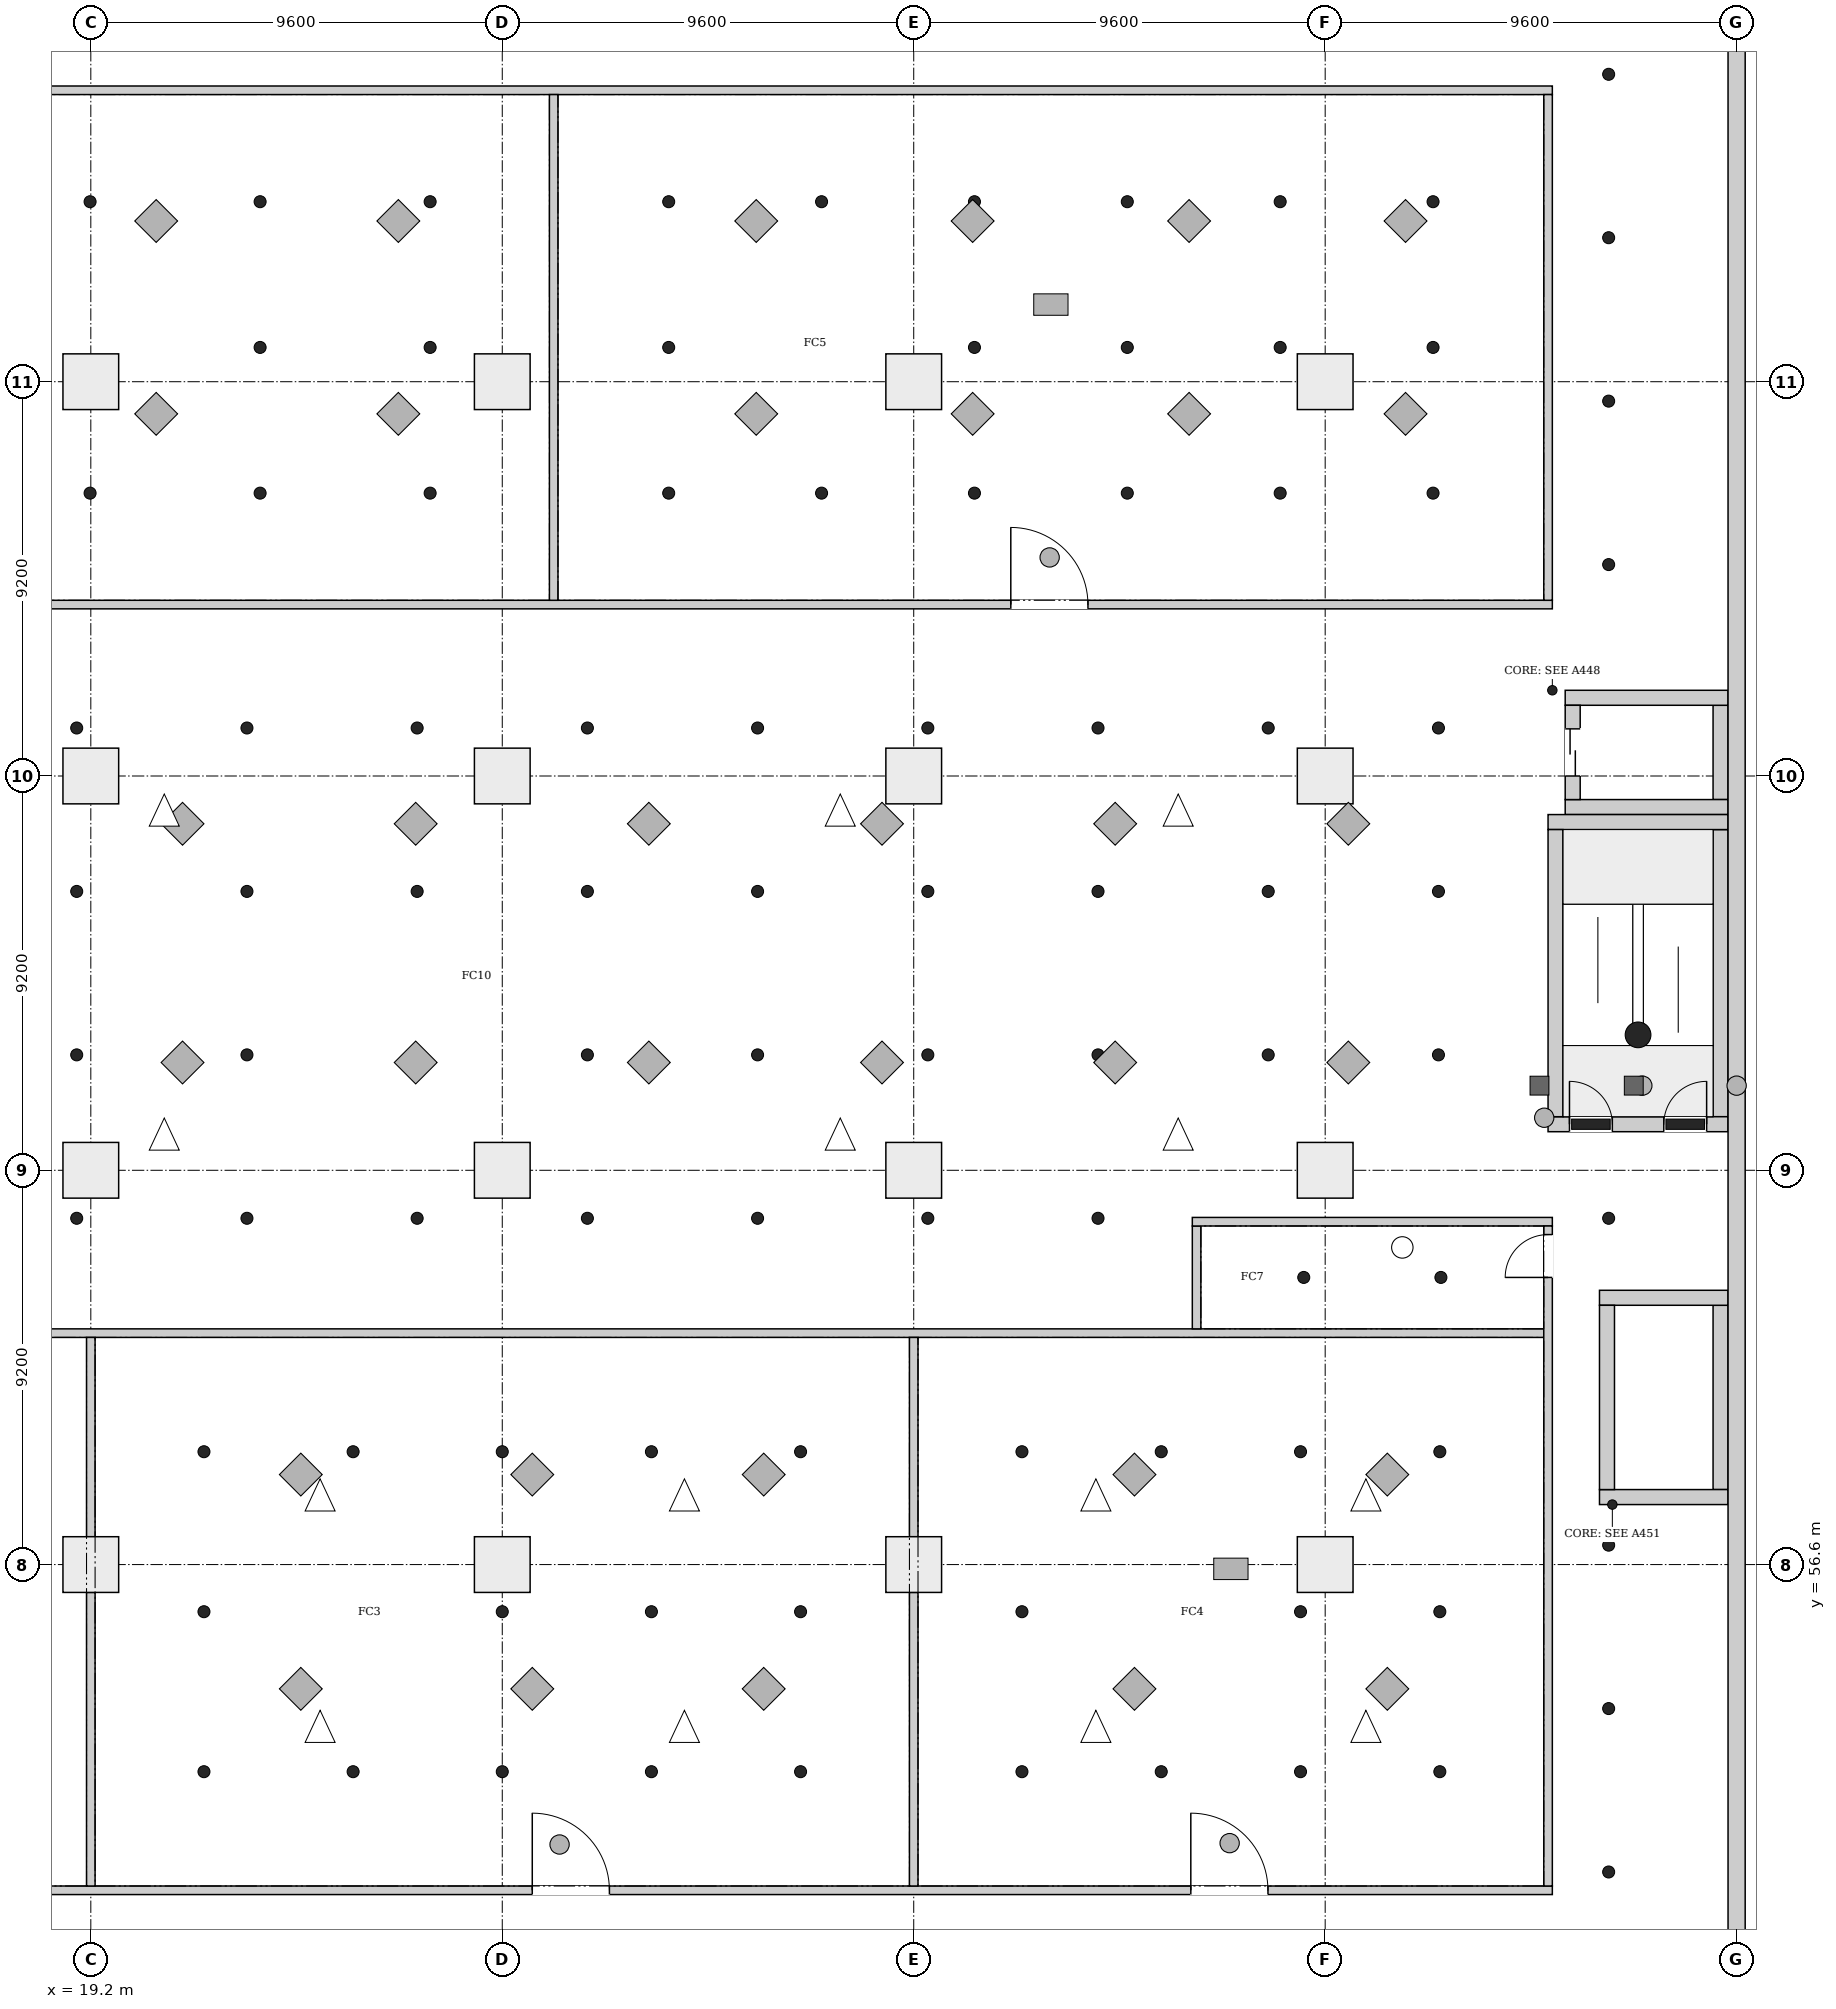
"""IFC4 building model, lengths in metres.
Left out: names, types, materials, properties, quantities, classifications, styles, units other than length and angle.
Written with IfcOpenShell. Run it as: python <this file> out.ifc"""

import sys

from ifc_helpers import new_model, si_unit, direction, frame, frame_2d, origin, origin_2d, place, context, subcontext, project, spatial, rectangle, extrude, element, fill, save


model = new_model("IFC4")
c1 = context("Model", 3, precision=1e-05, world=origin(), true_north=direction((0.0, 1.0)))
c2 = subcontext(c1, "Body", "Model", "MODEL_VIEW")
j1 = project(units=[si_unit("LENGTHUNIT", "METRE"), si_unit("PLANEANGLEUNIT", "RADIAN")], contexts=[c1])
p1 = place(None, origin())
s1 = spatial("IfcSite", under=j1, at=p1, CompositionType="ELEMENT")
p2 = place(p1, origin())
s2 = spatial("IfcBuilding", under=s1, at=p2, CompositionType="ELEMENT")
p3 = place(p2, frame((0.0, 0.0, 6.5)))
s3 = spatial("IfcBuildingStorey", under=s2, at=p3, CompositionType="ELEMENT", Elevation=6.5)
p4 = place(p3, frame((57.6, 46.72, 0.0), z_axis=(0.0, 0.0, 1.0), x_axis=(0.0, 1.0, 0.0)))
e1 = element("IfcWall", 1, at=p4, inside=s3, PredefinedType="SHEAR", context=c2, shape_type="SweptSolid", body=[
    extrude(rectangle(XDim=47.36, YDim=0.4, at=frame_2d((23.68, 0.0))), origin(), (0.0, 0.0, 1.0), 7.7),
])
p5 = place(p3, frame((53.2, 66.875, 0.0), z_axis=(0.0, 0.0, 1.0), x_axis=(1.0, 0.0, 0.0)))
e2 = element("IfcWall", 2, at=p5, inside=s3, PredefinedType="SHEAR", context=c2, shape_type="SweptSolid", body=[
    extrude(rectangle(XDim=4.2, YDim=0.35, at=frame_2d((2.1, 0.0))), origin(), (0.0, 0.0, 1.0), 7.7),
])
p6 = place(p5, frame((0.5, 0.0, 0.0)))
e3 = element("IfcOpeningElement", 3, at=p6, cuts=e2, PredefinedType="OPENING", context=c2, shape_type="SweptSolid", body=[
    extrude(rectangle(XDim=1.0, YDim=2.1, at=frame_2d((0.5, 1.05))), frame((0.0, 0.185, 0.0), z_axis=(0.0, -1.0, 0.0), x_axis=(1.0, 0.0, 0.0)), (0.0, 0.0, 1.0), 0.37),
])
p7 = place(p5, frame((2.7, 0.0, 0.0)))
e4 = element("IfcOpeningElement", 4, at=p7, cuts=e2, PredefinedType="OPENING", context=c2, shape_type="SweptSolid", body=[
    extrude(rectangle(XDim=1.0, YDim=2.1, at=frame_2d((0.5, 1.05))), frame((0.0, 0.185, 0.0), z_axis=(0.0, -1.0, 0.0), x_axis=(1.0, 0.0, 0.0)), (0.0, 0.0, 1.0), 0.37),
])
p8 = place(p3, frame((53.2, 73.925, 0.0), z_axis=(0.0, 0.0, 1.0), x_axis=(1.0, 0.0, 0.0)))
e5 = element("IfcWall", 5, at=p8, inside=s3, PredefinedType="SHEAR", context=c2, shape_type="SweptSolid", body=[
    extrude(rectangle(XDim=4.2, YDim=0.35, at=frame_2d((2.1, 0.0))), origin(), (0.0, 0.0, 1.0), 7.7),
])
for number, where, z_axis, x_axis in (
    (6, (53.375, 67.05, 0.0), (0.0, 0.0, 1.0), (0.0, 1.0, 0.0)),
    (7, (57.225, 67.05, 0.0), (0.0, 0.0, 1.0), (0.0, 1.0, 0.0)),
):
    element("IfcWall", number, at=place(p3, frame(where, z_axis=z_axis, x_axis=x_axis)), inside=s3, PredefinedType="SHEAR", context=c2, shape_type="SweptSolid", body=[
        extrude(rectangle(XDim=6.7, YDim=0.35, at=frame_2d((3.35, 0.0))), origin(), (0.0, 0.0, 1.0), 7.7),
    ])
for number, where, z_axis, x_axis in (
    (8, (53.6, 74.275, 0.0), (0.0, 0.0, 1.0), (1.0, 0.0, 0.0)),
    (9, (53.6, 76.825, 0.0), (0.0, 0.0, 1.0), (1.0, 0.0, 0.0)),
):
    element("IfcWall", number, at=place(p3, frame(where, z_axis=z_axis, x_axis=x_axis)), inside=s3, PredefinedType="SHEAR", context=c2, shape_type="SweptSolid", body=[
        extrude(rectangle(XDim=3.8, YDim=0.35, at=frame_2d((1.9, 0.0))), origin(), (0.0, 0.0, 1.0), 7.7),
    ])
p9 = place(p3, frame((53.775, 74.45, 0.0), z_axis=(0.0, 0.0, 1.0), x_axis=(0.0, 1.0, 0.0)))
e10 = element("IfcWall", 10, at=p9, inside=s3, PredefinedType="SHEAR", context=c2, shape_type="SweptSolid", body=[
    extrude(rectangle(XDim=2.2, YDim=0.35, at=frame_2d((1.1, 0.0))), origin(), (0.0, 0.0, 1.0), 7.7),
])
p10 = place(p9, frame((0.55, 0.0, 0.0)))
e11 = element("IfcOpeningElement", 11, at=p10, cuts=e10, PredefinedType="OPENING", context=c2, shape_type="SweptSolid", body=[
    extrude(rectangle(XDim=1.1, YDim=2.1, at=frame_2d((0.55, 1.05))), frame((0.0, 0.185, 0.0), z_axis=(0.0, -1.0, 0.0), x_axis=(1.0, 0.0, 0.0)), (0.0, 0.0, 1.0), 0.37),
])
p11 = place(p3, frame((57.225, 74.45, 0.0), z_axis=(0.0, 0.0, 1.0), x_axis=(0.0, 1.0, 0.0)))
e12 = element("IfcWall", 12, at=p11, inside=s3, PredefinedType="SHEAR", context=c2, shape_type="SweptSolid", body=[
    extrude(rectangle(XDim=2.2, YDim=0.35, at=frame_2d((1.1, 0.0))), origin(), (0.0, 0.0, 1.0), 7.7),
])
for number, where, z_axis, x_axis in (
    (13, (54.4, 58.175, 0.0), (0.0, 0.0, 1.0), (1.0, 0.0, 0.0)),
    (14, (54.4, 62.825, 0.0), (0.0, 0.0, 1.0), (1.0, 0.0, 0.0)),
):
    element("IfcWall", number, at=place(p3, frame(where, z_axis=z_axis, x_axis=x_axis)), inside=s3, PredefinedType="SHEAR", context=c2, shape_type="SweptSolid", body=[
        extrude(rectangle(XDim=3.0, YDim=0.35, at=frame_2d((1.5, 0.0))), origin(), (0.0, 0.0, 1.0), 7.7),
    ])
for number, where, z_axis, x_axis in (
    (15, (54.575, 58.35, 0.0), (0.0, 0.0, 1.0), (0.0, 1.0, 0.0)),
    (16, (57.225, 58.35, 0.0), (0.0, 0.0, 1.0), (0.0, 1.0, 0.0)),
):
    element("IfcWall", number, at=place(p3, frame(where, z_axis=z_axis, x_axis=x_axis)), inside=s3, PredefinedType="SHEAR", context=c2, shape_type="SweptSolid", body=[
        extrude(rectangle(XDim=4.3, YDim=0.35, at=frame_2d((2.15, 0.0))), origin(), (0.0, 0.0, 1.0), 7.7),
    ])
for number, where, z_axis, x_axis in (
    (17, (19.2, 56.6, 0.0), (0.0, 0.0, 1.0), (1.0, 0.0, 0.0)),
    (18, (28.8, 56.6, 0.0), (0.0, 0.0, 1.0), (1.0, 0.0, 0.0)),
    (19, (38.4, 56.6, 0.0), (0.0, 0.0, 1.0), (1.0, 0.0, 0.0)),
    (20, (48.0, 56.6, 0.0), (0.0, 0.0, 1.0), (1.0, 0.0, 0.0)),
    (21, (19.2, 65.8, 0.0), (0.0, 0.0, 1.0), (1.0, 0.0, 0.0)),
    (22, (28.8, 65.8, 0.0), (0.0, 0.0, 1.0), (1.0, 0.0, 0.0)),
    (23, (38.4, 65.8, 0.0), (0.0, 0.0, 1.0), (1.0, 0.0, 0.0)),
    (24, (48.0, 65.8, 0.0), (0.0, 0.0, 1.0), (1.0, 0.0, 0.0)),
    (25, (19.2, 75.0, 0.0), (0.0, 0.0, 1.0), (1.0, 0.0, 0.0)),
    (26, (28.8, 75.0, 0.0), (0.0, 0.0, 1.0), (1.0, 0.0, 0.0)),
    (27, (38.4, 75.0, 0.0), (0.0, 0.0, 1.0), (1.0, 0.0, 0.0)),
    (28, (48.0, 75.0, 0.0), (0.0, 0.0, 1.0), (1.0, 0.0, 0.0)),
    (29, (19.2, 84.2, 0.0), (0.0, 0.0, 1.0), (1.0, 0.0, 0.0)),
    (30, (28.8, 84.2, 0.0), (0.0, 0.0, 1.0), (1.0, 0.0, 0.0)),
    (31, (38.4, 84.2, 0.0), (0.0, 0.0, 1.0), (1.0, 0.0, 0.0)),
    (32, (48.0, 84.2, 0.0), (0.0, 0.0, 1.0), (1.0, 0.0, 0.0)),
):
    element("IfcColumn", number, at=place(p3, frame(where, z_axis=z_axis, x_axis=x_axis)), inside=s3, PredefinedType="COLUMN", context=c2, shape_type="SweptSolid", body=[
        extrude(rectangle(XDim=1.3, YDim=1.3, at=origin_2d()), origin(), (0.0, 0.0, 1.0), 7.7),
    ])
p12 = place(p3, frame((4.3, 49.0, 0.0), z_axis=(0.0, 0.0, 1.0), x_axis=(1.0, 0.0, 0.0)))
e33 = element("IfcWall", 33, at=p12, inside=s3, PredefinedType="PARTITIONING", context=c2, shape_type="SweptSolid", body=[
    extrude(rectangle(XDim=49.0, YDim=0.2, at=frame_2d((24.5, 0.0))), origin(), (0.0, 0.0, 1.0), 5.1),
])
p13 = place(p12, frame((6.635, 0.0, 0.0)))
e34 = element("IfcOpeningElement", 34, at=p13, cuts=e33, PredefinedType="OPENING", context=c2, shape_type="SweptSolid", body=[
    extrude(rectangle(XDim=1.8, YDim=2.1, at=frame_2d((0.9, 1.05))), frame((0.0, 0.11, 0.0), z_axis=(0.0, -1.0, 0.0), x_axis=(1.0, 0.0, 0.0)), (0.0, 0.0, 1.0), 0.22),
])
p14 = place(p12, frame((25.2, 0.0, 0.0)))
e35 = element("IfcOpeningElement", 35, at=p14, cuts=e33, PredefinedType="OPENING", context=c2, shape_type="SweptSolid", body=[
    extrude(rectangle(XDim=1.8, YDim=2.1, at=frame_2d((0.9, 1.05))), frame((0.0, 0.11, 0.0), z_axis=(0.0, -1.0, 0.0), x_axis=(1.0, 0.0, 0.0)), (0.0, 0.0, 1.0), 0.22),
])
p15 = place(p12, frame((40.565, 0.0, 0.0)))
e36 = element("IfcOpeningElement", 36, at=p15, cuts=e33, PredefinedType="OPENING", context=c2, shape_type="SweptSolid", body=[
    extrude(rectangle(XDim=1.8, YDim=2.1, at=frame_2d((0.9, 1.05))), frame((0.0, 0.11, 0.0), z_axis=(0.0, -1.0, 0.0), x_axis=(1.0, 0.0, 0.0)), (0.0, 0.0, 1.0), 0.22),
])
p16 = place(p3, frame((4.3, 79.0, 0.0), z_axis=(0.0, 0.0, 1.0), x_axis=(1.0, 0.0, 0.0)))
e37 = element("IfcWall", 37, at=p16, inside=s3, PredefinedType="PARTITIONING", context=c2, shape_type="SweptSolid", body=[
    extrude(rectangle(XDim=49.0, YDim=0.2, at=frame_2d((24.5, 0.0))), origin(), (0.0, 0.0, 1.0), 5.1),
])
p17 = place(p16, frame((12.035, 0.0, 0.0)))
e38 = element("IfcOpeningElement", 38, at=p17, cuts=e37, PredefinedType="OPENING", context=c2, shape_type="SweptSolid", body=[
    extrude(rectangle(XDim=1.8, YDim=2.1, at=frame_2d((0.9, 1.05))), frame((0.0, 0.11, 0.0), z_axis=(0.0, -1.0, 0.0), x_axis=(1.0, 0.0, 0.0)), (0.0, 0.0, 1.0), 0.22),
])
p18 = place(p16, frame((36.365, 0.0, 0.0)))
e39 = element("IfcOpeningElement", 39, at=p18, cuts=e37, PredefinedType="OPENING", context=c2, shape_type="SweptSolid", body=[
    extrude(rectangle(XDim=1.8, YDim=2.1, at=frame_2d((0.9, 1.05))), frame((0.0, 0.11, 0.0), z_axis=(0.0, -1.0, 0.0), x_axis=(1.0, 0.0, 0.0)), (0.0, 0.0, 1.0), 0.22),
])
p19 = place(p3, frame((4.3, 91.0, 0.0), z_axis=(0.0, 0.0, 1.0), x_axis=(1.0, 0.0, 0.0)))
e40 = element("IfcWall", 40, at=p19, inside=s3, PredefinedType="PARTITIONING", context=c2, shape_type="SweptSolid", body=[
    extrude(rectangle(XDim=49.0, YDim=0.2, at=frame_2d((24.5, 0.0))), origin(), (0.0, 0.0, 1.0), 5.1),
])
p20 = place(p3, frame((4.5, 62.0, 0.0), z_axis=(0.0, 0.0, 1.0), x_axis=(1.0, 0.0, 0.0)))
e41 = element("IfcWall", 41, at=p20, inside=s3, PredefinedType="PARTITIONING", context=c2, shape_type="SweptSolid", body=[
    extrude(rectangle(XDim=48.6, YDim=0.2, at=frame_2d((24.3, 0.0))), origin(), (0.0, 0.0, 1.0), 5.1),
])
p21 = place(p3, frame((19.2, 49.1, 0.0), z_axis=(0.0, 0.0, 1.0), x_axis=(0.0, 1.0, 0.0)))
e42 = element("IfcWall", 42, at=p21, inside=s3, PredefinedType="PARTITIONING", context=c2, shape_type="SweptSolid", body=[
    extrude(rectangle(XDim=6.85, YDim=0.2, at=frame_2d((3.425, 0.0))), origin(), (0.0, 0.0, 1.0), 4.7),
])
p22 = place(p3, frame((19.2, 57.25, 0.0), z_axis=(0.0, 0.0, 1.0), x_axis=(0.0, 1.0, 0.0)))
e43 = element("IfcWall", 43, at=p22, inside=s3, PredefinedType="PARTITIONING", context=c2, shape_type="SweptSolid", body=[
    extrude(rectangle(XDim=4.65, YDim=0.2, at=frame_2d((2.325, 0.0))), origin(), (0.0, 0.0, 1.0), 4.7),
])
p23 = place(p3, frame((30.0, 79.1, 0.0), z_axis=(0.0, 0.0, 1.0), x_axis=(0.0, 1.0, 0.0)))
e44 = element("IfcWall", 44, at=p23, inside=s3, PredefinedType="PARTITIONING", context=c2, shape_type="SweptSolid", body=[
    extrude(rectangle(XDim=11.8, YDim=0.2, at=frame_2d((5.9, 0.0))), origin(), (0.0, 0.0, 1.0), 5.1),
])
p24 = place(p3, frame((38.4, 49.1, 0.0), z_axis=(0.0, 0.0, 1.0), x_axis=(0.0, 1.0, 0.0)))
e45 = element("IfcWall", 45, at=p24, inside=s3, PredefinedType="PARTITIONING", context=c2, shape_type="SweptSolid", body=[
    extrude(rectangle(XDim=6.85, YDim=0.2, at=frame_2d((3.425, 0.0))), origin(), (0.0, 0.0, 1.0), 4.7),
])
p25 = place(p3, frame((38.4, 57.25, 0.0), z_axis=(0.0, 0.0, 1.0), x_axis=(0.0, 1.0, 0.0)))
e46 = element("IfcWall", 46, at=p25, inside=s3, PredefinedType="PARTITIONING", context=c2, shape_type="SweptSolid", body=[
    extrude(rectangle(XDim=4.65, YDim=0.2, at=frame_2d((2.325, 0.0))), origin(), (0.0, 0.0, 1.0), 4.7),
])
p26 = place(p3, frame((45.0, 62.1, 0.0), z_axis=(0.0, 0.0, 1.0), x_axis=(0.0, 1.0, 0.0)))
e47 = element("IfcWall", 47, at=p26, inside=s3, PredefinedType="PARTITIONING", context=c2, shape_type="SweptSolid", body=[
    extrude(rectangle(XDim=2.4, YDim=0.2, at=frame_2d((1.2, 0.0))), origin(), (0.0, 0.0, 1.0), 5.1),
])
p27 = place(p3, frame((44.9, 64.6, 0.0), z_axis=(0.0, 0.0, 1.0), x_axis=(1.0, 0.0, 0.0)))
e48 = element("IfcWall", 48, at=p27, inside=s3, PredefinedType="PARTITIONING", context=c2, shape_type="SweptSolid", body=[
    extrude(rectangle(XDim=8.4, YDim=0.2, at=frame_2d((4.2, 0.0))), origin(), (0.0, 0.0, 1.0), 5.1),
])
p28 = place(p3, frame((53.2, 49.1, 0.0), z_axis=(0.0, 0.0, 1.0), x_axis=(0.0, 1.0, 0.0)))
e49 = element("IfcWall", 49, at=p28, inside=s3, PredefinedType="PARTITIONING", context=c2, shape_type="SweptSolid", body=[
    extrude(rectangle(XDim=15.4, YDim=0.2, at=frame_2d((7.7, 0.0))), origin(), (0.0, 0.0, 1.0), 7.35),
])
p29 = place(p28, frame((14.2, 0.0, 0.0)))
e50 = element("IfcOpeningElement", 50, at=p29, cuts=e49, PredefinedType="OPENING", context=c2, shape_type="SweptSolid", body=[
    extrude(rectangle(XDim=1.0, YDim=2.1, at=frame_2d((0.5, 1.05))), frame((0.0, 0.11, 0.0), z_axis=(0.0, -1.0, 0.0), x_axis=(1.0, 0.0, 0.0)), (0.0, 0.0, 1.0), 0.22),
])
p30 = place(p3, frame((53.2, 79.1, 0.0), z_axis=(0.0, 0.0, 1.0), x_axis=(0.0, 1.0, 0.0)))
e51 = element("IfcWall", 51, at=p30, inside=s3, PredefinedType="PARTITIONING", context=c2, shape_type="SweptSolid", body=[
    extrude(rectangle(XDim=11.8, YDim=0.2, at=frame_2d((5.9, 0.0))), origin(), (0.0, 0.0, 1.0), 7.35),
])
p31 = place(p6, origin())
e52 = element("IfcDoor", 52, at=p31, inside=s3, OperationType="SINGLE_SWING_RIGHT", PredefinedType="DOOR", context=c2, shape_type="SweptSolid", body=[
    extrude(rectangle(XDim=1.0, YDim=2.1, at=frame_2d((0.5, 1.05))), frame((0.0, 0.025, 0.0), z_axis=(0.0, -1.0, 0.0), x_axis=(1.0, 0.0, 0.0)), (0.0, 0.0, 1.0), 0.05),
])
fill(e3, e52)
p32 = place(p7, origin())
e53 = element("IfcDoor", 53, at=p32, inside=s3, OperationType="SINGLE_SWING_LEFT", PredefinedType="DOOR", context=c2, shape_type="SweptSolid", body=[
    extrude(rectangle(XDim=1.0, YDim=2.1, at=frame_2d((0.5, 1.05))), frame((0.0, 0.025, 0.0), z_axis=(0.0, -1.0, 0.0), x_axis=(1.0, 0.0, 0.0)), (0.0, 0.0, 1.0), 0.05),
])
fill(e4, e53)
p33 = place(p10, origin())
e54 = element("IfcDoor", 54, at=p33, inside=s3, OperationType="DOUBLE_DOOR_SLIDING", PredefinedType="DOOR", context=c2, shape_type="SweptSolid", body=[
    extrude(rectangle(XDim=1.1, YDim=2.1, at=frame_2d((0.55, 1.05))), frame((0.0, 0.025, 0.0), z_axis=(0.0, -1.0, 0.0), x_axis=(1.0, 0.0, 0.0)), (0.0, 0.0, 1.0), 0.05),
])
fill(e11, e54)
p34 = place(p14, origin())
e55 = element("IfcDoor", 55, at=p34, inside=s3, OperationType="DOUBLE_DOOR_SINGLE_SWING", PredefinedType="DOOR", context=c2, shape_type="SweptSolid", body=[
    extrude(rectangle(XDim=1.8, YDim=2.1, at=frame_2d((0.9, 1.05))), frame((0.0, 0.025, 0.0), z_axis=(0.0, -1.0, 0.0), x_axis=(1.0, 0.0, 0.0)), (0.0, 0.0, 1.0), 0.05),
])
fill(e35, e55)
p35 = place(p15, origin())
e56 = element("IfcDoor", 56, at=p35, inside=s3, OperationType="DOUBLE_DOOR_SINGLE_SWING", PredefinedType="DOOR", context=c2, shape_type="SweptSolid", body=[
    extrude(rectangle(XDim=1.8, YDim=2.1, at=frame_2d((0.9, 1.05))), frame((0.0, 0.025, 0.0), z_axis=(0.0, -1.0, 0.0), x_axis=(1.0, 0.0, 0.0)), (0.0, 0.0, 1.0), 0.05),
])
fill(e36, e56)
p36 = place(p18, origin())
e57 = element("IfcDoor", 57, at=p36, inside=s3, OperationType="DOUBLE_DOOR_SINGLE_SWING", PredefinedType="DOOR", context=c2, shape_type="SweptSolid", body=[
    extrude(rectangle(XDim=1.8, YDim=2.1, at=frame_2d((0.9, 1.05))), frame((0.0, 0.025, 0.0), z_axis=(0.0, -1.0, 0.0), x_axis=(1.0, 0.0, 0.0)), (0.0, 0.0, 1.0), 0.05),
])
fill(e39, e57)
p37 = place(p29, origin())
e58 = element("IfcDoor", 58, at=p37, inside=s3, OperationType="SINGLE_SWING_RIGHT", PredefinedType="DOOR", context=c2, shape_type="SweptSolid", body=[
    extrude(rectangle(XDim=1.0, YDim=2.1, at=frame_2d((0.5, 1.05))), frame((0.0, 0.025, 0.0), z_axis=(0.0, -1.0, 0.0), x_axis=(1.0, 0.0, 0.0)), (0.0, 0.0, 1.0), 0.05),
])
fill(e50, e58)
save(model, sys.argv[1])
